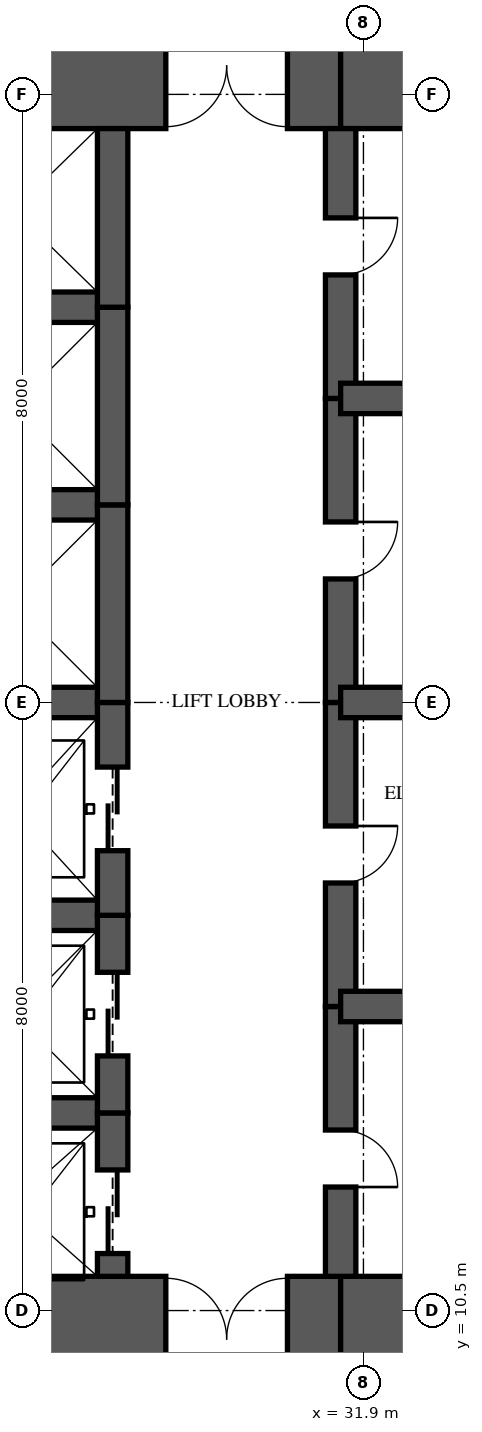
"""IFC4 building model, lengths in metres.
Left out: names, types, materials, properties, quantities, classifications, styles, units other than length and angle.
Written with IfcOpenShell. Run it as: python <this file> out.ifc"""

import sys

from ifc_helpers import new_model, si_unit, direction, frame, frame_2d, origin, place, context, subcontext, project, spatial, rectangle, extrude, element, fill, save


model = new_model("IFC4")
c1 = context("Model", 3, precision=1e-05, world=origin(), true_north=direction((0.0, 1.0)))
c2 = subcontext(c1, "Body", "Model", "MODEL_VIEW")
j1 = project(units=[si_unit("LENGTHUNIT", "METRE"), si_unit("PLANEANGLEUNIT", "RADIAN")], contexts=[c1])
p1 = place(None, origin())
s1 = spatial("IfcSite", under=j1, at=p1, CompositionType="ELEMENT")
p2 = place(p1, origin())
s2 = spatial("IfcBuilding", under=s1, at=p2, CompositionType="ELEMENT")
p3 = place(p2, frame((0.0, 0.0, 61.2)))
s3 = spatial("IfcBuildingStorey", under=s2, at=p3, CompositionType="ELEMENT", Elevation=61.2)
p4 = place(p3, frame((26.0, 10.125, 0.0), z_axis=(0.0, 0.0, 1.0), x_axis=(1.0, 0.0, 0.0)))
e1 = element("IfcWall", 1, at=p4, inside=s3, PredefinedType="SHEAR", context=c2, shape_type="SweptSolid", body=[
    extrude(rectangle(XDim=5.6, YDim=1.65, at=frame_2d((2.8, 0.0))), origin(), (0.0, 0.0, 1.0), 3.35),
])
p5 = place(p4, frame((3.3, 0.0, 0.0)))
e2 = element("IfcOpeningElement", 2, at=p5, cuts=e1, PredefinedType="OPENING", context=c2, shape_type="SweptSolid", body=[
    extrude(rectangle(XDim=1.6, YDim=2.1, at=frame_2d((0.8, 1.05))), frame((0.0, 0.835, 0.0), z_axis=(0.0, -1.0, 0.0), x_axis=(1.0, 0.0, 0.0)), (0.0, 0.0, 1.0), 1.67),
])
for number, where, z_axis, x_axis in (
    (3, (31.6, 10.125, 0.0), (0.0, 0.0, 1.0), (1.0, 0.0, 0.0)),
    (4, (35.9, 26.875, 0.0), (0.0, 0.0, 1.0), (-1.0, 0.0, 0.0)),
):
    element("IfcWall", number, at=place(p3, frame(where, z_axis=z_axis, x_axis=x_axis)), inside=s3, PredefinedType="SHEAR", context=c2, shape_type="SweptSolid", body=[
        extrude(rectangle(XDim=4.3, YDim=1.65, at=frame_2d((2.15, 0.0))), origin(), (0.0, 0.0, 1.0), 3.35),
    ])
p6 = place(p3, frame((31.6, 26.875, 0.0), z_axis=(0.0, 0.0, 1.0), x_axis=(-1.0, 0.0, 0.0)))
e5 = element("IfcWall", 5, at=p6, inside=s3, PredefinedType="SHEAR", context=c2, shape_type="SweptSolid", body=[
    extrude(rectangle(XDim=5.6, YDim=1.65, at=frame_2d((2.8, 0.0))), origin(), (0.0, 0.0, 1.0), 3.35),
])
p7 = place(p6, frame((0.7, 0.0, 0.0)))
e6 = element("IfcOpeningElement", 6, at=p7, cuts=e5, PredefinedType="OPENING", context=c2, shape_type="SweptSolid", body=[
    extrude(rectangle(XDim=1.6, YDim=2.1, at=frame_2d((0.8, 1.05))), frame((0.0, 0.835, 0.0), z_axis=(0.0, -1.0, 0.0), x_axis=(1.0, 0.0, 0.0)), (0.0, 0.0, 1.0), 1.67),
])
p8 = place(p3, frame((28.6, 10.95, 0.0), z_axis=(0.0, 0.0, 1.0), x_axis=(0.0, 1.0, 0.0)))
e7 = element("IfcWall", 7, at=p8, inside=s3, PredefinedType="SHEAR", context=c2, shape_type="SweptSolid", body=[
    extrude(rectangle(XDim=2.15, YDim=0.4, at=frame_2d((1.075, 0.0))), origin(), (0.0, 0.0, 1.0), 3.35),
])
p9 = place(p8, frame((0.3, 0.0, 0.0)))
e8 = element("IfcOpeningElement", 8, at=p9, cuts=e7, PredefinedType="OPENING", context=c2, shape_type="SweptSolid", body=[
    extrude(rectangle(XDim=1.1, YDim=2.1, at=frame_2d((0.55, 1.05))), frame((0.0, 0.21, 0.0), z_axis=(0.0, -1.0, 0.0), x_axis=(1.0, 0.0, 0.0)), (0.0, 0.0, 1.0), 0.42),
])
p10 = place(p3, frame((28.6, 13.1, 0.0), z_axis=(0.0, 0.0, 1.0), x_axis=(0.0, 1.0, 0.0)))
e9 = element("IfcWall", 9, at=p10, inside=s3, PredefinedType="SHEAR", context=c2, shape_type="SweptSolid", body=[
    extrude(rectangle(XDim=2.6, YDim=0.4, at=frame_2d((1.3, 0.0))), origin(), (0.0, 0.0, 1.0), 3.35),
])
p11 = place(p10, frame((0.75, 0.0, 0.0)))
e10 = element("IfcOpeningElement", 10, at=p11, cuts=e9, PredefinedType="OPENING", context=c2, shape_type="SweptSolid", body=[
    extrude(rectangle(XDim=1.1, YDim=2.1, at=frame_2d((0.55, 1.05))), frame((0.0, 0.21, 0.0), z_axis=(0.0, -1.0, 0.0), x_axis=(1.0, 0.0, 0.0)), (0.0, 0.0, 1.0), 0.42),
])
p12 = place(p3, frame((28.6, 15.7, 0.0), z_axis=(0.0, 0.0, 1.0), x_axis=(0.0, 1.0, 0.0)))
e11 = element("IfcWall", 11, at=p12, inside=s3, PredefinedType="SHEAR", context=c2, shape_type="SweptSolid", body=[
    extrude(rectangle(XDim=2.8, YDim=0.4, at=frame_2d((1.4, 0.0))), origin(), (0.0, 0.0, 1.0), 3.35),
])
p13 = place(p12, frame((0.85, 0.0, 0.0)))
e12 = element("IfcOpeningElement", 12, at=p13, cuts=e11, PredefinedType="OPENING", context=c2, shape_type="SweptSolid", body=[
    extrude(rectangle(XDim=1.1, YDim=2.1, at=frame_2d((0.55, 1.05))), frame((0.0, 0.21, 0.0), z_axis=(0.0, -1.0, 0.0), x_axis=(1.0, 0.0, 0.0)), (0.0, 0.0, 1.0), 0.42),
])
p14 = place(p3, frame((28.6, 18.5, 0.0), z_axis=(0.0, 0.0, 1.0), x_axis=(0.0, 1.0, 0.0)))
e13 = element("IfcWall", 13, at=p14, inside=s3, PredefinedType="SHEAR", context=c2, shape_type="SweptSolid", body=[
    extrude(rectangle(XDim=2.6, YDim=0.4, at=frame_2d((1.3, 0.0))), origin(), (0.0, 0.0, 1.0), 3.35),
])
p15 = place(p3, frame((28.6, 21.1, 0.0), z_axis=(0.0, 0.0, 1.0), x_axis=(0.0, 1.0, 0.0)))
e14 = element("IfcWall", 14, at=p15, inside=s3, PredefinedType="SHEAR", context=c2, shape_type="SweptSolid", body=[
    extrude(rectangle(XDim=2.6, YDim=0.4, at=frame_2d((1.3, 0.0))), origin(), (0.0, 0.0, 1.0), 3.35),
])
p16 = place(p3, frame((28.6, 23.7, 0.0), z_axis=(0.0, 0.0, 1.0), x_axis=(0.0, 1.0, 0.0)))
e15 = element("IfcWall", 15, at=p16, inside=s3, PredefinedType="SHEAR", context=c2, shape_type="SweptSolid", body=[
    extrude(rectangle(XDim=2.35, YDim=0.4, at=frame_2d((1.175, 0.0))), origin(), (0.0, 0.0, 1.0), 3.35),
])
p17 = place(p3, frame((31.6, 10.95, 0.0), z_axis=(0.0, 0.0, 1.0), x_axis=(0.0, 1.0, 0.0)))
e16 = element("IfcWall", 16, at=p17, inside=s3, PredefinedType="SHEAR", context=c2, shape_type="SweptSolid", body=[
    extrude(rectangle(XDim=3.55, YDim=0.4, at=frame_2d((1.775, 0.0))), origin(), (0.0, 0.0, 1.0), 3.35),
])
p18 = place(p17, frame((1.175, 0.0, 0.0)))
e17 = element("IfcOpeningElement", 17, at=p18, cuts=e16, PredefinedType="OPENING", context=c2, shape_type="SweptSolid", body=[
    extrude(rectangle(XDim=0.75, YDim=2.1, at=frame_2d((0.375, 1.05))), frame((0.0, 0.21, 0.0), z_axis=(0.0, -1.0, 0.0), x_axis=(1.0, 0.0, 0.0)), (0.0, 0.0, 1.0), 0.42),
])
p19 = place(p3, frame((31.6, 14.5, 0.0), z_axis=(0.0, 0.0, 1.0), x_axis=(0.0, 1.0, 0.0)))
e18 = element("IfcWall", 18, at=p19, inside=s3, PredefinedType="SHEAR", context=c2, shape_type="SweptSolid", body=[
    extrude(rectangle(XDim=4.0, YDim=0.4, at=frame_2d((2.0, 0.0))), origin(), (0.0, 0.0, 1.0), 3.35),
])
p20 = place(p19, frame((1.625, 0.0, 0.0)))
e19 = element("IfcOpeningElement", 19, at=p20, cuts=e18, PredefinedType="OPENING", context=c2, shape_type="SweptSolid", body=[
    extrude(rectangle(XDim=0.75, YDim=2.1, at=frame_2d((0.375, 1.05))), frame((0.0, 0.21, 0.0), z_axis=(0.0, -1.0, 0.0), x_axis=(1.0, 0.0, 0.0)), (0.0, 0.0, 1.0), 0.42),
])
p21 = place(p3, frame((31.6, 18.5, 0.0), z_axis=(0.0, 0.0, 1.0), x_axis=(0.0, 1.0, 0.0)))
e20 = element("IfcWall", 20, at=p21, inside=s3, PredefinedType="SHEAR", context=c2, shape_type="SweptSolid", body=[
    extrude(rectangle(XDim=4.0, YDim=0.4, at=frame_2d((2.0, 0.0))), origin(), (0.0, 0.0, 1.0), 3.35),
])
p22 = place(p21, frame((1.625, 0.0, 0.0)))
e21 = element("IfcOpeningElement", 21, at=p22, cuts=e20, PredefinedType="OPENING", context=c2, shape_type="SweptSolid", body=[
    extrude(rectangle(XDim=0.75, YDim=2.1, at=frame_2d((0.375, 1.05))), frame((0.0, 0.21, 0.0), z_axis=(0.0, -1.0, 0.0), x_axis=(1.0, 0.0, 0.0)), (0.0, 0.0, 1.0), 0.42),
])
p23 = place(p3, frame((31.6, 22.5, 0.0), z_axis=(0.0, 0.0, 1.0), x_axis=(0.0, 1.0, 0.0)))
e22 = element("IfcWall", 22, at=p23, inside=s3, PredefinedType="SHEAR", context=c2, shape_type="SweptSolid", body=[
    extrude(rectangle(XDim=3.55, YDim=0.4, at=frame_2d((1.775, 0.0))), origin(), (0.0, 0.0, 1.0), 3.35),
])
p24 = place(p23, frame((1.625, 0.0, 0.0)))
e23 = element("IfcOpeningElement", 23, at=p24, cuts=e22, PredefinedType="OPENING", context=c2, shape_type="SweptSolid", body=[
    extrude(rectangle(XDim=0.75, YDim=2.1, at=frame_2d((0.375, 1.05))), frame((0.0, 0.21, 0.0), z_axis=(0.0, -1.0, 0.0), x_axis=(1.0, 0.0, 0.0)), (0.0, 0.0, 1.0), 0.42),
])
for number, where, z_axis, x_axis in (
    (24, (26.0, 13.1, 0.0), (0.0, 0.0, 1.0), (1.0, 0.0, 0.0)),
    (25, (26.0, 15.7, 0.0), (0.0, 0.0, 1.0), (1.0, 0.0, 0.0)),
    (26, (26.0, 18.5, 0.0), (0.0, 0.0, 1.0), (1.0, 0.0, 0.0)),
    (27, (26.0, 21.1, 0.0), (0.0, 0.0, 1.0), (1.0, 0.0, 0.0)),
    (28, (26.0, 23.7, 0.0), (0.0, 0.0, 1.0), (1.0, 0.0, 0.0)),
):
    element("IfcWall", number, at=place(p3, frame(where, z_axis=z_axis, x_axis=x_axis)), inside=s3, PredefinedType="SHEAR", context=c2, shape_type="SweptSolid", body=[
        extrude(rectangle(XDim=2.6, YDim=0.4, at=frame_2d((1.3, 0.0))), origin(), (0.0, 0.0, 1.0), 3.35),
    ])
for number, where, z_axis, x_axis in (
    (29, (31.6, 14.5, 0.0), (0.0, 0.0, 1.0), (1.0, 0.0, 0.0)),
    (30, (31.6, 18.5, 0.0), (0.0, 0.0, 1.0), (1.0, 0.0, 0.0)),
    (31, (31.6, 22.5, 0.0), (0.0, 0.0, 1.0), (1.0, 0.0, 0.0)),
):
    element("IfcWall", number, at=place(p3, frame(where, z_axis=z_axis, x_axis=x_axis)), inside=s3, PredefinedType="SHEAR", context=c2, shape_type="SweptSolid", body=[
        extrude(rectangle(XDim=4.3, YDim=0.4, at=frame_2d((2.15, 0.0))), origin(), (0.0, 0.0, 1.0), 3.35),
    ])
p25 = place(p9, origin())
e32 = element("IfcDoor", 32, at=p25, inside=s3, OperationType="SLIDING_TO_LEFT", PredefinedType="DOOR", context=c2, shape_type="SweptSolid", body=[
    extrude(rectangle(XDim=1.1, YDim=2.1, at=frame_2d((0.55, 1.05))), frame((0.0, 0.025, 0.0), z_axis=(0.0, -1.0, 0.0), x_axis=(1.0, 0.0, 0.0)), (0.0, 0.0, 1.0), 0.05),
])
fill(e8, e32)
p26 = place(p11, origin())
e33 = element("IfcDoor", 33, at=p26, inside=s3, OperationType="SLIDING_TO_LEFT", PredefinedType="DOOR", context=c2, shape_type="SweptSolid", body=[
    extrude(rectangle(XDim=1.1, YDim=2.1, at=frame_2d((0.55, 1.05))), frame((0.0, 0.025, 0.0), z_axis=(0.0, -1.0, 0.0), x_axis=(1.0, 0.0, 0.0)), (0.0, 0.0, 1.0), 0.05),
])
fill(e10, e33)
p27 = place(p13, origin())
e34 = element("IfcDoor", 34, at=p27, inside=s3, OperationType="SLIDING_TO_LEFT", PredefinedType="DOOR", context=c2, shape_type="SweptSolid", body=[
    extrude(rectangle(XDim=1.1, YDim=2.1, at=frame_2d((0.55, 1.05))), frame((0.0, 0.025, 0.0), z_axis=(0.0, -1.0, 0.0), x_axis=(1.0, 0.0, 0.0)), (0.0, 0.0, 1.0), 0.05),
])
fill(e12, e34)
p28 = place(p5, origin())
e35 = element("IfcDoor", 35, at=p28, inside=s3, OperationType="DOUBLE_DOOR_SINGLE_SWING", PredefinedType="DOOR", context=c2, shape_type="SweptSolid", body=[
    extrude(rectangle(XDim=1.6, YDim=2.1, at=frame_2d((0.8, 1.05))), frame((0.0, 0.025, 0.0), z_axis=(0.0, -1.0, 0.0), x_axis=(1.0, 0.0, 0.0)), (0.0, 0.0, 1.0), 0.05),
])
fill(e2, e35)
p29 = place(p7, origin())
e36 = element("IfcDoor", 36, at=p29, inside=s3, OperationType="DOUBLE_DOOR_SINGLE_SWING", PredefinedType="DOOR", context=c2, shape_type="SweptSolid", body=[
    extrude(rectangle(XDim=1.6, YDim=2.1, at=frame_2d((0.8, 1.05))), frame((0.0, 0.025, 0.0), z_axis=(0.0, -1.0, 0.0), x_axis=(1.0, 0.0, 0.0)), (0.0, 0.0, 1.0), 0.05),
])
fill(e6, e36)
p30 = place(p18, frame((0.75, 0.0, 0.0), z_axis=(0.0, 0.0, 1.0), x_axis=(-1.0, 0.0, 0.0)))
e37 = element("IfcDoor", 37, at=p30, inside=s3, OperationType="SINGLE_SWING_RIGHT", PredefinedType="DOOR", context=c2, shape_type="SweptSolid", body=[
    extrude(rectangle(XDim=0.75, YDim=2.1, at=frame_2d((0.375, 1.05))), frame((0.0, 0.025, 0.0), z_axis=(0.0, -1.0, 0.0), x_axis=(1.0, 0.0, 0.0)), (0.0, 0.0, 1.0), 0.05),
])
fill(e17, e37)
p31 = place(p20, frame((0.75, 0.0, 0.0), z_axis=(0.0, 0.0, 1.0), x_axis=(-1.0, 0.0, 0.0)))
e38 = element("IfcDoor", 38, at=p31, inside=s3, OperationType="SINGLE_SWING_LEFT", PredefinedType="DOOR", context=c2, shape_type="SweptSolid", body=[
    extrude(rectangle(XDim=0.75, YDim=2.1, at=frame_2d((0.375, 1.05))), frame((0.0, 0.025, 0.0), z_axis=(0.0, -1.0, 0.0), x_axis=(1.0, 0.0, 0.0)), (0.0, 0.0, 1.0), 0.05),
])
fill(e19, e38)
p32 = place(p22, frame((0.75, 0.0, 0.0), z_axis=(0.0, 0.0, 1.0), x_axis=(-1.0, 0.0, 0.0)))
e39 = element("IfcDoor", 39, at=p32, inside=s3, OperationType="SINGLE_SWING_LEFT", PredefinedType="DOOR", context=c2, shape_type="SweptSolid", body=[
    extrude(rectangle(XDim=0.75, YDim=2.1, at=frame_2d((0.375, 1.05))), frame((0.0, 0.025, 0.0), z_axis=(0.0, -1.0, 0.0), x_axis=(1.0, 0.0, 0.0)), (0.0, 0.0, 1.0), 0.05),
])
fill(e21, e39)
p33 = place(p24, frame((0.75, 0.0, 0.0), z_axis=(0.0, 0.0, 1.0), x_axis=(-1.0, 0.0, 0.0)))
e40 = element("IfcDoor", 40, at=p33, inside=s3, OperationType="SINGLE_SWING_LEFT", PredefinedType="DOOR", context=c2, shape_type="SweptSolid", body=[
    extrude(rectangle(XDim=0.75, YDim=2.1, at=frame_2d((0.375, 1.05))), frame((0.0, 0.025, 0.0), z_axis=(0.0, -1.0, 0.0), x_axis=(1.0, 0.0, 0.0)), (0.0, 0.0, 1.0), 0.05),
])
fill(e23, e40)
save(model, sys.argv[1])
